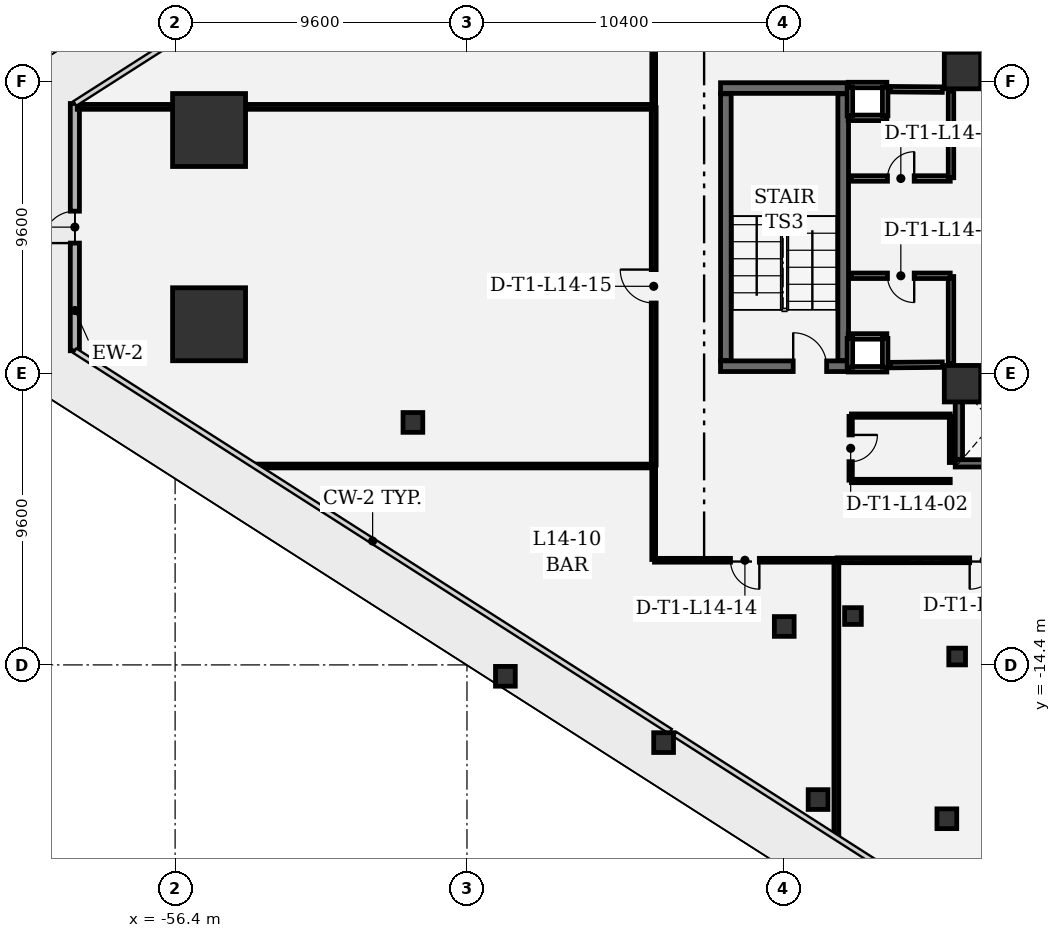
"""IFC4 building model, lengths in metres.
Left out: names, types, materials, properties, quantities, classifications, styles, units other than length and angle.
Written with IfcOpenShell. Run it as: python <this file> out.ifc"""

import sys

from ifc_helpers import new_model, si_unit, direction, frame, frame_2d, origin, origin_2d, place, context, subcontext, project, spatial, rectangle, extrude, element, fill, save


model = new_model("IFC4")
c1 = context("Model", 3, precision=1e-05, world=origin(), true_north=direction((0.0, 1.0)))
c2 = subcontext(c1, "Body", "Model", "MODEL_VIEW")
j1 = project(units=[si_unit("LENGTHUNIT", "METRE"), si_unit("PLANEANGLEUNIT", "RADIAN")], contexts=[c1])
p1 = place(None, origin())
s1 = spatial("IfcSite", under=j1, at=p1, CompositionType="ELEMENT")
p2 = place(p1, origin())
s2 = spatial("IfcBuilding", under=s1, at=p2, CompositionType="ELEMENT")
p3 = place(p2, frame((0.0, 0.0, 66.0)))
s3 = spatial("IfcBuildingStorey", under=s2, at=p3, CompositionType="ELEMENT", Elevation=66.0)
for number, where, z_axis, x_axis in (
    (1, (-55.283, 3.195, 0.0), (0.0, 0.0, 1.0), (1.0, 0.0, 0.0)),
    (2, (-55.283, -3.195, 0.0), (0.0, 0.0, 1.0), (1.0, 0.0, 0.0)),
):
    element("IfcColumn", number, at=place(p3, frame(where, z_axis=z_axis, x_axis=x_axis)), inside=s3, PredefinedType="COLUMN", context=c2, shape_type="SweptSolid", body=[
        extrude(rectangle(XDim=2.4, YDim=2.4, at=origin_2d()), origin(), (0.0, 0.0, 1.0), 4.2),
    ])
for number, where, z_axis, x_axis in (
    (3, (-30.5, 5.15, 0.0), (0.0, 0.0, 1.0), (1.0, 0.0, 0.0)),
    (4, (-30.5, -5.15, 0.0), (0.0, 0.0, 1.0), (1.0, 0.0, 0.0)),
):
    element("IfcColumn", number, at=place(p3, frame(where, z_axis=z_axis, x_axis=x_axis)), inside=s3, PredefinedType="COLUMN", context=c2, shape_type="SweptSolid", body=[
        extrude(rectangle(XDim=1.2, YDim=1.2, at=origin_2d()), origin(), (0.0, 0.0, 1.0), 4.2),
    ])
for number, where, z_axis, x_axis in (
    (5, (-45.536, -14.775, 0.0), (0.0, 0.0, 1.0), (1.0, 0.0, 0.0)),
    (6, (-40.333, -16.956, 0.0), (0.0, 0.0, 1.0), (1.0, 0.0, 0.0)),
    (7, (-35.252, -18.829, 0.0), (0.0, 0.0, 1.0), (1.0, 0.0, 0.0)),
    (8, (-31.016, -19.46, 0.0), (0.0, 0.0, 1.0), (1.0, 0.0, 0.0)),
    (9, (-48.578, -6.425, 0.0), (0.0, 0.0, 1.0), (1.0, 0.0, 0.0)),
    (10, (-36.365, -13.135, 0.0), (0.0, 0.0, 1.0), (1.0, 0.0, 0.0)),
):
    element("IfcColumn", number, at=place(p3, frame(where, z_axis=z_axis, x_axis=x_axis)), inside=s3, PredefinedType="COLUMN", context=c2, shape_type="SweptSolid", body=[
        extrude(rectangle(XDim=0.65, YDim=0.65, at=origin_2d()), origin(), (0.0, 0.0, 1.0), 4.2),
    ])
for number, where, z_axis, x_axis in (
    (11, (-34.104, -12.792, 0.0), (0.0, 0.0, 1.0), (1.0, 0.0, 0.0)),
    (12, (-30.677, -14.124, 0.0), (0.0, 0.0, 1.0), (1.0, 0.0, 0.0)),
):
    element("IfcColumn", number, at=place(p3, frame(where, z_axis=z_axis, x_axis=x_axis)), inside=s3, PredefinedType="COLUMN", context=c2, shape_type="SweptSolid", body=[
        extrude(rectangle(XDim=0.55, YDim=0.55, at=origin_2d()), origin(), (0.0, 0.0, 1.0), 4.2),
    ])
p4 = place(p3, frame((-59.697, -4.067, 0.0), z_axis=(0.0, 0.0, 1.0), x_axis=(0.0, 1.0, 0.0)))
e13 = element("IfcWall", 13, at=p4, inside=s3, PredefinedType="SOLIDWALL", context=c2, shape_type="SweptSolid", body=[
    extrude(rectangle(XDim=8.134, YDim=0.3, at=frame_2d((4.067, 0.0))), origin(), (0.0, 0.0, 1.0), 3.92),
])
p5 = place(p4, frame((3.542, 0.0, 0.0)))
e14 = element("IfcOpeningElement", 14, at=p5, cuts=e13, PredefinedType="OPENING", context=c2, shape_type="SweptSolid", body=[
    extrude(rectangle(XDim=1.05, YDim=2.2, at=frame_2d((0.525, 1.1))), frame((0.0, 0.16, 0.0), z_axis=(0.0, -1.0, 0.0), x_axis=(1.0, 0.0, 0.0)), (0.0, 0.0, 1.0), 0.32),
])
p6 = place(p3, frame((-38.46, -4.575, 0.0), z_axis=(0.0, 0.0, 1.0), x_axis=(1.0, 0.0, 0.0)))
e15 = element("IfcWall", 15, at=p6, inside=s3, PredefinedType="SHEAR", context=c2, shape_type="SweptSolid", body=[
    extrude(rectangle(XDim=4.21, YDim=0.35, at=frame_2d((2.105, 0.0))), origin(), (0.0, 0.0, 1.0), 3.92),
])
p7 = place(p6, frame((2.39, 0.0, 0.0)))
e16 = element("IfcOpeningElement", 16, at=p7, cuts=e15, PredefinedType="OPENING", context=c2, shape_type="SweptSolid", body=[
    extrude(rectangle(XDim=1.1, YDim=2.2, at=frame_2d((0.55, 1.1))), frame((0.0, 0.185, 0.0), z_axis=(0.0, -1.0, 0.0), x_axis=(1.0, 0.0, 0.0)), (0.0, 0.0, 1.0), 0.37),
])
p8 = place(p3, frame((-34.25, 4.575, 0.0), z_axis=(0.0, 0.0, 1.0), x_axis=(-1.0, 0.0, 0.0)))
e17 = element("IfcWall", 17, at=p8, inside=s3, PredefinedType="SHEAR", context=c2, shape_type="SweptSolid", body=[
    extrude(rectangle(XDim=4.21, YDim=0.35, at=frame_2d((2.105, 0.0))), origin(), (0.0, 0.0, 1.0), 3.92),
])
for number, where, z_axis, x_axis in (
    (18, (-34.425, -4.385, 0.0), (0.0, 0.0, 1.0), (0.0, 1.0, 0.0)),
    (19, (-38.285, 4.385, 0.0), (0.0, 0.0, 1.0), (0.0, -1.0, 0.0)),
):
    element("IfcWall", number, at=place(p3, frame(where, z_axis=z_axis, x_axis=x_axis)), inside=s3, PredefinedType="SHEAR", context=c2, shape_type="SweptSolid", body=[
        extrude(rectangle(XDim=8.77, YDim=0.35, at=frame_2d((4.385, 0.0))), origin(), (0.0, 0.0, 1.0), 3.92),
    ])
p9 = place(p3, frame((-28.26, 5.13, 0.0), z_axis=(0.0, 0.0, 1.0), x_axis=(-1.0, 0.0, 0.0)))
e20 = element("IfcWall", 20, at=p9, inside=s3, PredefinedType="SHEAR", context=c2, shape_type="SweptSolid", body=[
    extrude(rectangle(XDim=2.48, YDim=0.24, at=frame_2d((1.24, 0.0))), origin(), (0.0, 0.0, 1.0), 3.92),
])
p10 = place(p3, frame((-30.62, 5.262, 0.0), z_axis=(0.0, 0.0, 1.0), x_axis=(0.0, 1.0, 0.0)))
e21 = element("IfcWall", 21, at=p10, inside=s3, PredefinedType="SHEAR", context=c2, shape_type="SweptSolid", body=[
    extrude(rectangle(XDim=2.376, YDim=0.24, at=frame_2d((1.188, 0.0))), origin(), (0.0, 0.0, 1.0), 3.92),
])
for number, where, z_axis, x_axis in (
    (22, (-28.26, -7.77, 0.0), (0.0, 0.0, 1.0), (-1.0, 0.0, 0.0)),
    (23, (-30.74, -5.13, 0.0), (0.0, 0.0, 1.0), (1.0, 0.0, 0.0)),
):
    element("IfcWall", number, at=place(p3, frame(where, z_axis=z_axis, x_axis=x_axis)), inside=s3, PredefinedType="SHEAR", context=c2, shape_type="SweptSolid", body=[
        extrude(rectangle(XDim=2.48, YDim=0.24, at=frame_2d((1.24, 0.0))), origin(), (0.0, 0.0, 1.0), 3.92),
    ])
p11 = place(p3, frame((-30.62, -7.638, 0.0), z_axis=(0.0, 0.0, 1.0), x_axis=(0.0, 1.0, 0.0)))
e24 = element("IfcWall", 24, at=p11, inside=s3, PredefinedType="SHEAR", context=c2, shape_type="SweptSolid", body=[
    extrude(rectangle(XDim=2.376, YDim=0.24, at=frame_2d((1.188, 0.0))), origin(), (0.0, 0.0, 1.0), 3.92),
])
for number, where, z_axis, x_axis in (
    (25, (-32.99, 3.595, 0.0), (0.0, 0.0, 1.0), (-1.0, 0.0, 0.0)),
    (26, (-34.26, 4.675, 0.0), (0.0, 0.0, 1.0), (1.0, 0.0, 0.0)),
):
    element("IfcWall", number, at=place(p3, frame(where, z_axis=z_axis, x_axis=x_axis)), inside=s3, PredefinedType="PARTITIONING", context=c2, shape_type="SweptSolid", body=[
        extrude(rectangle(XDim=1.27, YDim=0.18, at=frame_2d((0.635, 0.0))), origin(), (0.0, 0.0, 1.0), 3.92),
    ])
for number, where, z_axis, x_axis in (
    (27, (-34.205, 3.66, 0.0), (0.0, 0.0, 1.0), (0.0, 1.0, 0.0)),
    (28, (-33.045, 4.61, 0.0), (0.0, 0.0, 1.0), (0.0, -1.0, 0.0)),
):
    element("IfcWall", number, at=place(p3, frame(where, z_axis=z_axis, x_axis=x_axis)), inside=s3, PredefinedType="PARTITIONING", context=c2, shape_type="SweptSolid", body=[
        extrude(rectangle(XDim=0.95, YDim=0.18, at=frame_2d((0.475, 0.0))), origin(), (0.0, 0.0, 1.0), 3.92),
    ])
for number, where, z_axis, x_axis in (
    (29, (-32.99, -4.675, 0.0), (0.0, 0.0, 1.0), (-1.0, 0.0, 0.0)),
    (30, (-34.26, -3.595, 0.0), (0.0, 0.0, 1.0), (1.0, 0.0, 0.0)),
):
    element("IfcWall", number, at=place(p3, frame(where, z_axis=z_axis, x_axis=x_axis)), inside=s3, PredefinedType="PARTITIONING", context=c2, shape_type="SweptSolid", body=[
        extrude(rectangle(XDim=1.27, YDim=0.18, at=frame_2d((0.635, 0.0))), origin(), (0.0, 0.0, 1.0), 3.92),
    ])
for number, where, z_axis, x_axis in (
    (31, (-34.205, -4.61, 0.0), (0.0, 0.0, 1.0), (0.0, 1.0, 0.0)),
    (32, (-33.045, -3.66, 0.0), (0.0, 0.0, 1.0), (0.0, -1.0, 0.0)),
):
    element("IfcWall", number, at=place(p3, frame(where, z_axis=z_axis, x_axis=x_axis)), inside=s3, PredefinedType="PARTITIONING", context=c2, shape_type="SweptSolid", body=[
        extrude(rectangle(XDim=0.95, YDim=0.18, at=frame_2d((0.475, 0.0))), origin(), (0.0, 0.0, 1.0), 3.92),
    ])
p12 = place(p3, frame((-34.18, -6.225, 0.0), z_axis=(0.0, 0.0, 1.0), x_axis=(0.0, -1.0, 0.0)))
e33 = element("IfcWall", 33, at=p12, inside=s3, PredefinedType="PARTITIONING", context=c2, shape_type="SweptSolid", body=[
    extrude(rectangle(XDim=2.1, YDim=0.11, at=frame_2d((1.05, 0.0))), origin(), (0.0, 0.0, 1.0), 3.92),
])
p13 = place(p12, frame((0.61, 0.0, 0.0)))
e34 = element("IfcOpeningElement", 34, at=p13, cuts=e33, PredefinedType="OPENING", context=c2, shape_type="SweptSolid", body=[
    extrude(rectangle(XDim=0.88, YDim=2.1, at=frame_2d((0.44, 1.05))), frame((0.0, 0.065, 0.0), z_axis=(0.0, -1.0, 0.0), x_axis=(1.0, 0.0, 0.0)), (0.0, 0.0, 1.0), 0.13),
])
p14 = place(p3, frame((-34.155, -8.35, 0.0), z_axis=(0.0, 0.0, 1.0), x_axis=(1.0, 0.0, 0.0)))
e35 = element("IfcWall", 35, at=p14, inside=s3, PredefinedType="PARTITIONING", context=c2, shape_type="SweptSolid", body=[
    extrude(rectangle(XDim=3.25, YDim=0.11, at=frame_2d((1.625, 0.0))), origin(), (0.0, 0.0, 1.0), 3.92),
])
p15 = place(p3, frame((-30.88, -7.743, 0.0), z_axis=(0.0, 0.0, 1.0), x_axis=(0.0, 1.0, 0.0)))
e36 = element("IfcWall", 36, at=p15, inside=s3, PredefinedType="PARTITIONING", context=c2, shape_type="SweptSolid", body=[
    extrude(rectangle(XDim=1.518, YDim=0.11, at=frame_2d((0.759, 0.0))), origin(), (0.0, 0.0, 1.0), 3.92),
])
p16 = place(p3, frame((-30.905, -6.2, 0.0), z_axis=(0.0, 0.0, 1.0), x_axis=(-1.0, 0.0, 0.0)))
e37 = element("IfcWall", 37, at=p16, inside=s3, PredefinedType="PARTITIONING", context=c2, shape_type="SweptSolid", body=[
    extrude(rectangle(XDim=3.25, YDim=0.11, at=frame_2d((1.625, 0.0))), origin(), (0.0, 0.0, 1.0), 3.433),
])
p17 = place(p3, frame((-34.155, 1.6, 0.0), z_axis=(0.0, 0.0, 1.0), x_axis=(1.0, 0.0, 0.0)))
e38 = element("IfcWall", 38, at=p17, inside=s3, PredefinedType="PARTITIONING", context=c2, shape_type="SweptSolid", body=[
    extrude(rectangle(XDim=3.25, YDim=0.18, at=frame_2d((1.625, 0.0))), origin(), (0.0, 0.0, 1.0), 3.92),
])
p18 = place(p17, frame((1.185, 0.0, 0.0)))
e39 = element("IfcOpeningElement", 39, at=p18, cuts=e38, PredefinedType="OPENING", context=c2, shape_type="SweptSolid", body=[
    extrude(rectangle(XDim=0.88, YDim=2.1, at=frame_2d((0.44, 1.05))), frame((0.0, 0.1, 0.0), z_axis=(0.0, -1.0, 0.0), x_axis=(1.0, 0.0, 0.0)), (0.0, 0.0, 1.0), 0.2),
])
p19 = place(p3, frame((-30.88, 1.625, 0.0), z_axis=(0.0, 0.0, 1.0), x_axis=(0.0, 1.0, 0.0)))
e40 = element("IfcWall", 40, at=p19, inside=s3, PredefinedType="PARTITIONING", context=c2, shape_type="SweptSolid", body=[
    extrude(rectangle(XDim=2.86, YDim=0.18, at=frame_2d((1.43, 0.0))), origin(), (0.0, 0.0, 1.0), 3.92),
])
for number, where, z_axis, x_axis in (
    (41, (-31.165, 4.522, 0.0), (0.0, 0.0, 1.0), (-1.0, 0.009, 0.0)),
    (42, (-32.88, -4.538, 0.0), (0.0, 0.0, 1.0), (1.0, 0.009, 0.0)),
):
    element("IfcWall", number, at=place(p3, frame(where, z_axis=z_axis, x_axis=x_axis)), inside=s3, PredefinedType="PARTITIONING", context=c2, shape_type="SweptSolid", body=[
        extrude(rectangle(XDim=1.715, YDim=0.18, at=frame_2d((0.857, 0.0))), origin(), (0.0, 0.0, 1.0), 3.92),
    ])
p20 = place(p3, frame((-30.88, -4.485, 0.0), z_axis=(0.0, 0.0, 1.0), x_axis=(0.0, 1.0, 0.0)))
e43 = element("IfcWall", 43, at=p20, inside=s3, PredefinedType="PARTITIONING", context=c2, shape_type="SweptSolid", body=[
    extrude(rectangle(XDim=2.86, YDim=0.18, at=frame_2d((1.43, 0.0))), origin(), (0.0, 0.0, 1.0), 3.92),
])
p21 = place(p3, frame((-30.905, -1.6, 0.0), z_axis=(0.0, 0.0, 1.0), x_axis=(-1.0, 0.0, 0.0)))
e44 = element("IfcWall", 44, at=p21, inside=s3, PredefinedType="PARTITIONING", context=c2, shape_type="SweptSolid", body=[
    extrude(rectangle(XDim=3.25, YDim=0.18, at=frame_2d((1.625, 0.0))), origin(), (0.0, 0.0, 1.0), 3.92),
])
p22 = place(p21, frame((1.185, 0.0, 0.0)))
e45 = element("IfcOpeningElement", 45, at=p22, cuts=e44, PredefinedType="OPENING", context=c2, shape_type="SweptSolid", body=[
    extrude(rectangle(XDim=0.88, YDim=2.1, at=frame_2d((0.44, 1.05))), frame((0.0, 0.1, 0.0), z_axis=(0.0, -1.0, 0.0), x_axis=(1.0, 0.0, 0.0)), (0.0, 0.0, 1.0), 0.2),
])
p23 = place(p3, frame((-24.956, -10.958, 0.0), z_axis=(0.0, 0.0, 1.0), x_axis=(-1.0, 0.0, 0.0)))
e46 = element("IfcWall", 46, at=p23, inside=s3, PredefinedType="PARTITIONING", context=c2, shape_type="SweptSolid", body=[
    extrude(rectangle(XDim=9.669, YDim=0.16, at=frame_2d((4.834, 0.0))), origin(), (0.0, 0.0, 1.0), 3.433),
])
p24 = place(p23, frame((4.36, 0.0, 0.0)))
e47 = element("IfcOpeningElement", 47, at=p24, cuts=e46, PredefinedType="OPENING", context=c2, shape_type="SweptSolid", body=[
    extrude(rectangle(XDim=0.95, YDim=2.15, at=frame_2d((0.475, 1.075))), frame((0.0, 0.09, 0.0), z_axis=(0.0, -1.0, 0.0), x_axis=(1.0, 0.0, 0.0)), (0.0, 0.0, 1.0), 0.18),
])
p25 = place(p3, frame((-34.65, -10.983, 0.0), z_axis=(0.0, 0.0, 1.0), x_axis=(0.0, -1.0, 0.0)))
e48 = element("IfcWall", 48, at=p25, inside=s3, PredefinedType="PARTITIONING", context=c2, shape_type="SweptSolid", body=[
    extrude(rectangle(XDim=9.012, YDim=0.16, at=frame_2d((4.506, 0.0))), origin(), (0.0, 0.0, 1.0), 3.92),
])
p26 = place(p3, frame((-34.683, -10.958, 0.0), z_axis=(0.0, 0.0, 1.0), x_axis=(-1.0, 0.0, 0.0)))
e49 = element("IfcWall", 49, at=p26, inside=s3, PredefinedType="PARTITIONING", context=c2, shape_type="SweptSolid", body=[
    extrude(rectangle(XDim=5.95, YDim=0.125, at=frame_2d((2.975, 0.0))), origin(), (0.0, 0.0, 1.0), 3.433),
])
p27 = place(p26, frame((2.5, 0.0, 0.0)))
e50 = element("IfcOpeningElement", 50, at=p27, cuts=e49, PredefinedType="OPENING", context=c2, shape_type="SweptSolid", body=[
    extrude(rectangle(XDim=0.95, YDim=2.15, at=frame_2d((0.475, 1.075))), frame((0.0, 0.073, 0.0), z_axis=(0.0, -1.0, 0.0), x_axis=(1.0, 0.0, 0.0)), (0.0, 0.0, 1.0), 0.145),
])
p28 = place(p3, frame((-40.658, -10.933, 0.0), z_axis=(0.0, 0.0, 1.0), x_axis=(0.0, 1.0, 0.0)))
e51 = element("IfcWall", 51, at=p28, inside=s3, PredefinedType="PARTITIONING", context=c2, shape_type="SweptSolid", body=[
    extrude(rectangle(XDim=3.051, YDim=0.125, at=frame_2d((1.525, 0.0))), origin(), (0.0, 0.0, 1.0), 3.92),
])
p29 = place(p3, frame((-40.683, -7.857, 0.0), z_axis=(0.0, 0.0, 1.0), x_axis=(-1.0, 0.0, 0.0)))
e52 = element("IfcWall", 52, at=p29, inside=s3, PredefinedType="PARTITIONING", context=c2, shape_type="SweptSolid", body=[
    extrude(rectangle(XDim=13.003, YDim=0.125, at=frame_2d((6.502, 0.0))), origin(), (0.0, 0.0, 1.0), 2.89),
])
p30 = place(p3, frame((-40.658, -7.824, 0.0), z_axis=(0.0, 0.0, 1.0), x_axis=(0.0, 1.0, 0.0)))
e53 = element("IfcWall", 53, at=p30, inside=s3, PredefinedType="PARTITIONING", context=c2, shape_type="SweptSolid", body=[
    extrude(rectangle(XDim=11.756, YDim=0.16, at=frame_2d((5.878, 0.0))), origin(), (0.0, 0.0, 1.0), 3.92),
])
p31 = place(p30, frame((5.328, 0.0, 0.0)))
e54 = element("IfcOpeningElement", 54, at=p31, cuts=e53, PredefinedType="OPENING", context=c2, shape_type="SweptSolid", body=[
    extrude(rectangle(XDim=1.1, YDim=2.15, at=frame_2d((0.55, 1.075))), frame((0.0, 0.09, 0.0), z_axis=(0.0, -1.0, 0.0), x_axis=(1.0, 0.0, 0.0)), (0.0, 0.0, 1.0), 0.18),
])
p32 = place(p3, frame((-40.683, 3.957, 0.0), z_axis=(0.0, 0.0, 1.0), x_axis=(-1.0, 0.0, 0.0)))
e55 = element("IfcWall", 55, at=p32, inside=s3, PredefinedType="PARTITIONING", context=c2, shape_type="SweptSolid", body=[
    extrude(rectangle(XDim=13.335, YDim=0.16, at=frame_2d((6.667, 0.0))), origin(), (0.0, 0.0, 1.0), 2.89),
])
p33 = place(p3, frame((-56.548, 3.957, 0.0), z_axis=(0.0, 0.0, 1.0), x_axis=(-1.0, 0.0, 0.0)))
e56 = element("IfcWall", 56, at=p33, inside=s3, PredefinedType="PARTITIONING", context=c2, shape_type="SweptSolid", body=[
    extrude(rectangle(XDim=3.069, YDim=0.16, at=frame_2d((1.535, 0.0))), origin(), (0.0, 0.0, 1.0), 3.92),
])
p34 = place(p3, frame((-40.658, 3.99, 0.0), z_axis=(0.0, 0.0, 1.0), x_axis=(0.0, 1.0, 0.0)))
e57 = element("IfcWall", 57, at=p34, inside=s3, PredefinedType="PARTITIONING", context=c2, shape_type="SweptSolid", body=[
    extrude(rectangle(XDim=6.744, YDim=0.125, at=frame_2d((3.372, 0.0))), origin(), (0.0, 0.0, 1.0), 3.92),
])
p35 = place(p34, frame((2.897, 0.0, 0.0)))
e58 = element("IfcOpeningElement", 58, at=p35, cuts=e57, PredefinedType="OPENING", context=c2, shape_type="SweptSolid", body=[
    extrude(rectangle(XDim=0.95, YDim=2.15, at=frame_2d((0.475, 1.075))), frame((0.0, 0.073, 0.0), z_axis=(0.0, -1.0, 0.0), x_axis=(1.0, 0.0, 0.0)), (0.0, 0.0, 1.0), 0.145),
])
p36 = place(p5, origin())
e59 = element("IfcDoor", 59, at=p36, inside=s3, OperationType="SINGLE_SWING_LEFT", PredefinedType="DOOR", context=c2, shape_type="SweptSolid", body=[
    extrude(rectangle(XDim=1.05, YDim=2.2, at=frame_2d((0.525, 1.1))), frame((0.0, 0.025, 0.0), z_axis=(0.0, -1.0, 0.0), x_axis=(1.0, 0.0, 0.0)), (0.0, 0.0, 1.0), 0.05),
])
fill(e14, e59)
p37 = place(p7, origin())
e60 = element("IfcDoor", 60, at=p37, inside=s3, OperationType="SINGLE_SWING_LEFT", PredefinedType="DOOR", context=c2, shape_type="SweptSolid", body=[
    extrude(rectangle(XDim=1.1, YDim=2.2, at=frame_2d((0.55, 1.1))), frame((0.0, 0.025, 0.0), z_axis=(0.0, -1.0, 0.0), x_axis=(1.0, 0.0, 0.0)), (0.0, 0.0, 1.0), 0.05),
])
fill(e16, e60)
p38 = place(p13, origin())
e61 = element("IfcDoor", 61, at=p38, inside=s3, OperationType="SINGLE_SWING_LEFT", PredefinedType="DOOR", context=c2, shape_type="SweptSolid", body=[
    extrude(rectangle(XDim=0.88, YDim=2.1, at=frame_2d((0.44, 1.05))), frame((0.0, 0.025, 0.0), z_axis=(0.0, -1.0, 0.0), x_axis=(1.0, 0.0, 0.0)), (0.0, 0.0, 1.0), 0.05),
])
fill(e34, e61)
p39 = place(p18, origin())
e62 = element("IfcDoor", 62, at=p39, inside=s3, OperationType="SINGLE_SWING_RIGHT", PredefinedType="DOOR", context=c2, shape_type="SweptSolid", body=[
    extrude(rectangle(XDim=0.88, YDim=2.1, at=frame_2d((0.44, 1.05))), frame((0.0, 0.025, 0.0), z_axis=(0.0, -1.0, 0.0), x_axis=(1.0, 0.0, 0.0)), (0.0, 0.0, 1.0), 0.05),
])
fill(e39, e62)
p40 = place(p22, origin())
e63 = element("IfcDoor", 63, at=p40, inside=s3, OperationType="SINGLE_SWING_LEFT", PredefinedType="DOOR", context=c2, shape_type="SweptSolid", body=[
    extrude(rectangle(XDim=0.88, YDim=2.1, at=frame_2d((0.44, 1.05))), frame((0.0, 0.025, 0.0), z_axis=(0.0, -1.0, 0.0), x_axis=(1.0, 0.0, 0.0)), (0.0, 0.0, 1.0), 0.05),
])
fill(e45, e63)
p41 = place(p24, origin())
e64 = element("IfcDoor", 64, at=p41, inside=s3, OperationType="SINGLE_SWING_RIGHT", PredefinedType="DOOR", context=c2, shape_type="SweptSolid", body=[
    extrude(rectangle(XDim=0.95, YDim=2.15, at=frame_2d((0.475, 1.075))), frame((0.0, 0.025, 0.0), z_axis=(0.0, -1.0, 0.0), x_axis=(1.0, 0.0, 0.0)), (0.0, 0.0, 1.0), 0.05),
])
fill(e47, e64)
p42 = place(p27, origin())
e65 = element("IfcDoor", 65, at=p42, inside=s3, OperationType="SINGLE_SWING_LEFT", PredefinedType="DOOR", context=c2, shape_type="SweptSolid", body=[
    extrude(rectangle(XDim=0.95, YDim=2.15, at=frame_2d((0.475, 1.075))), frame((0.0, 0.025, 0.0), z_axis=(0.0, -1.0, 0.0), x_axis=(1.0, 0.0, 0.0)), (0.0, 0.0, 1.0), 0.05),
])
fill(e50, e65)
p43 = place(p31, origin())
e66 = element("IfcDoor", 66, at=p43, inside=s3, OperationType="SINGLE_SWING_RIGHT", PredefinedType="DOOR", context=c2, shape_type="SweptSolid", body=[
    extrude(rectangle(XDim=1.1, YDim=2.15, at=frame_2d((0.55, 1.075))), frame((0.0, 0.025, 0.0), z_axis=(0.0, -1.0, 0.0), x_axis=(1.0, 0.0, 0.0)), (0.0, 0.0, 1.0), 0.05),
])
fill(e54, e66)
save(model, sys.argv[1])
